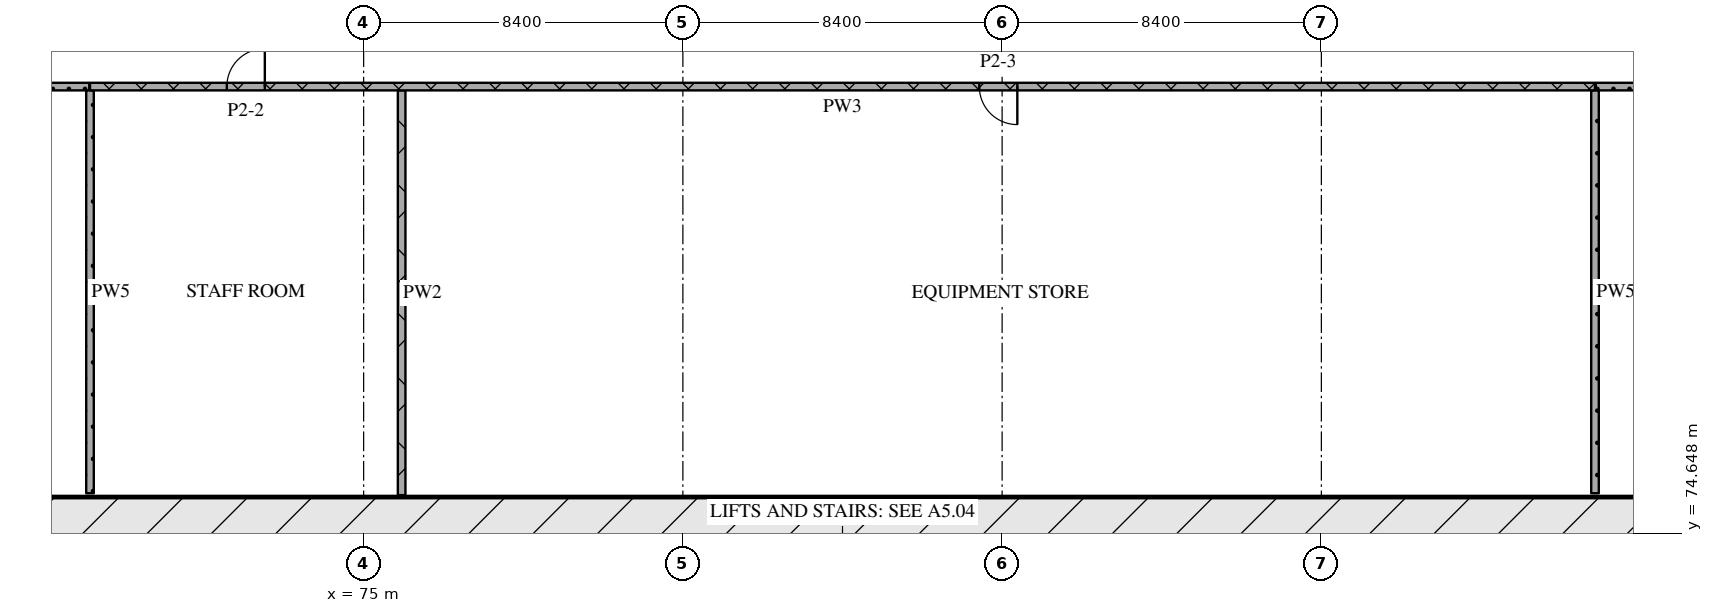
"""IFC4 building model, lengths in metres.
Left out: names, types, materials, properties, quantities, classifications, styles, units other than length and angle.
Written with IfcOpenShell. Run it as: python <this file> out.ifc"""

import sys

from ifc_helpers import new_model, si_unit, direction, frame, frame_2d, origin, place, context, subcontext, project, spatial, rectangle, extrude, element, fill, save


model = new_model("IFC4")
c1 = context("Model", 3, precision=1e-05, world=origin(), true_north=direction((0.0, 1.0)))
c2 = subcontext(c1, "Body", "Model", "MODEL_VIEW")
j1 = project(units=[si_unit("LENGTHUNIT", "METRE"), si_unit("PLANEANGLEUNIT", "RADIAN")], contexts=[c1])
p1 = place(None, origin())
s1 = spatial("IfcSite", under=j1, at=p1, CompositionType="ELEMENT")
p2 = place(p1, origin())
s2 = spatial("IfcBuilding", under=s1, at=p2, CompositionType="ELEMENT")
p3 = place(p2, frame((0.0, 0.0, 14.4)))
s3 = spatial("IfcBuildingStorey", under=s2, at=p3, CompositionType="ELEMENT", Elevation=14.4)
p4 = place(p3, frame((66.6, 75.0, 0.0), z_axis=(0.0, 0.0, 1.0), x_axis=(1.0, 0.0, 0.0)))
e1 = element("IfcWall", 1, at=p4, inside=s3, PredefinedType="SOLIDWALL", context=c2, shape_type="SweptSolid", body=[
    extrude(rectangle(XDim=42.0, YDim=1.2, at=frame_2d((21.0, 0.0))), origin(), (0.0, 0.0, 1.0), 4.5),
])
p5 = place(p3, frame((107.4, 86.4, 0.0), z_axis=(0.0, 0.0, 1.0), x_axis=(-1.0, 0.0, 0.0)))
e2 = element("IfcWall", 2, at=p5, inside=s3, PredefinedType="PARTITIONING", context=c2, shape_type="SweptSolid", body=[
    extrude(rectangle(XDim=39.6, YDim=0.2, at=frame_2d((19.8, 0.0))), origin(), (0.0, 0.0, 1.0), 4.5),
])
p6 = place(p5, frame((15.2, 0.0, 0.0)))
e3 = element("IfcOpeningElement", 3, at=p6, cuts=e2, PredefinedType="OPENING", context=c2, shape_type="SweptSolid", body=[
    extrude(rectangle(XDim=1.0, YDim=2.1, at=frame_2d((0.5, 1.05))), frame((0.0, 0.11, 0.0), z_axis=(0.0, -1.0, 0.0), x_axis=(1.0, 0.0, 0.0)), (0.0, 0.0, 1.0), 0.22),
])
p7 = place(p5, frame((35.0, 0.0, 0.0)))
e4 = element("IfcOpeningElement", 4, at=p7, cuts=e2, PredefinedType="OPENING", context=c2, shape_type="SweptSolid", body=[
    extrude(rectangle(XDim=1.0, YDim=2.1, at=frame_2d((0.5, 1.05))), frame((0.0, 0.11, 0.0), z_axis=(0.0, -1.0, 0.0), x_axis=(1.0, 0.0, 0.0)), (0.0, 0.0, 1.0), 0.22),
])
p8 = place(p3, frame((35.4, 86.4, 0.0), z_axis=(0.0, 0.0, 1.0), x_axis=(1.0, 0.0, 0.0)))
e5 = element("IfcWall", 5, at=p8, inside=s3, PredefinedType="PARTITIONING", context=c2, shape_type="SweptSolid", body=[
    extrude(rectangle(XDim=32.38, YDim=0.2, at=frame_2d((16.19, 0.0))), origin(), (0.0, 0.0, 1.0), 4.5),
])
p9 = place(p3, frame((107.42, 86.4, 0.0), z_axis=(0.0, 0.0, 1.0), x_axis=(1.0, 0.0, 0.0)))
e6 = element("IfcWall", 6, at=p9, inside=s3, PredefinedType="PARTITIONING", context=c2, shape_type="SweptSolid", body=[
    extrude(rectangle(XDim=23.83, YDim=0.2, at=frame_2d((11.915, 0.0))), origin(), (0.0, 0.0, 1.0), 4.5),
])
p10 = place(p3, frame((67.8, 86.3, 0.0), z_axis=(0.0, 0.0, 1.0), x_axis=(0.0, -1.0, 0.0)))
e7 = element("IfcWall", 7, at=p10, inside=s3, PredefinedType="PARTITIONING", context=c2, shape_type="SweptSolid", body=[
    extrude(rectangle(XDim=10.6, YDim=0.2, at=frame_2d((5.3, 0.0))), origin(), (0.0, 0.0, 1.0), 4.5),
])
p11 = place(p3, frame((76.0, 86.3, 0.0), z_axis=(0.0, 0.0, 1.0), x_axis=(0.0, -1.0, 0.0)))
e8 = element("IfcWall", 8, at=p11, inside=s3, PredefinedType="PARTITIONING", context=c2, shape_type="SweptSolid", body=[
    extrude(rectangle(XDim=10.65, YDim=0.2, at=frame_2d((5.325, 0.0))), origin(), (0.0, 0.0, 1.0), 4.5),
])
p12 = place(p3, frame((107.4, 86.3, 0.0), z_axis=(0.0, 0.0, 1.0), x_axis=(0.0, -1.0, 0.0)))
e9 = element("IfcWall", 9, at=p12, inside=s3, PredefinedType="PARTITIONING", context=c2, shape_type="SweptSolid", body=[
    extrude(rectangle(XDim=10.6, YDim=0.2, at=frame_2d((5.3, 0.0))), origin(), (0.0, 0.0, 1.0), 4.5),
])
p13 = place(p6, origin())
e10 = element("IfcDoor", 10, at=p13, inside=s3, OperationType="SINGLE_SWING_LEFT", PredefinedType="DOOR", context=c2, shape_type="SweptSolid", body=[
    extrude(rectangle(XDim=1.0, YDim=2.1, at=frame_2d((0.5, 1.05))), frame((0.0, 0.025, 0.0), z_axis=(0.0, -1.0, 0.0), x_axis=(1.0, 0.0, 0.0)), (0.0, 0.0, 1.0), 0.05),
])
fill(e3, e10)
p14 = place(p7, origin())
e11 = element("IfcDoor", 11, at=p14, inside=s3, OperationType="SINGLE_SWING_RIGHT", PredefinedType="DOOR", context=c2, shape_type="SweptSolid", body=[
    extrude(rectangle(XDim=1.0, YDim=2.1, at=frame_2d((0.5, 1.05))), frame((0.0, 0.025, 0.0), z_axis=(0.0, -1.0, 0.0), x_axis=(1.0, 0.0, 0.0)), (0.0, 0.0, 1.0), 0.05),
])
fill(e4, e11)
save(model, sys.argv[1])
